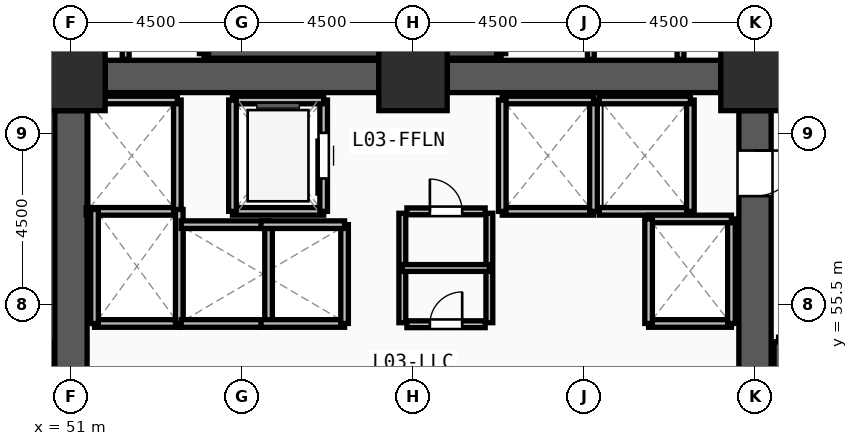
"""IFC4 building model, lengths in metres.
Left out: names, types, materials, properties, quantities, classifications, styles, units other than length and angle.
Written with IfcOpenShell. Run it as: python <this file> out.ifc"""

import sys

from ifc_helpers import new_model, si_unit, direction, frame, frame_2d, origin, origin_2d, place, context, subcontext, project, spatial, rectangle, extrude, source, transform, mapped, element, fill, save


model = new_model("IFC4")
c1 = context("Model", 3, precision=1e-05, world=origin(), true_north=direction((0.0, 1.0)))
c2 = subcontext(c1, "Body", "Model", "MODEL_VIEW")
j1 = project(units=[si_unit("LENGTHUNIT", "METRE"), si_unit("PLANEANGLEUNIT", "RADIAN")], contexts=[c1])
p1 = place(None, origin())
s1 = spatial("IfcSite", under=j1, at=p1, CompositionType="ELEMENT")
p2 = place(p1, origin())
s2 = spatial("IfcBuilding", under=s1, at=p2, CompositionType="ELEMENT")
p3 = place(p2, frame((0.0, 0.0, 9.9)))
s3 = spatial("IfcBuildingStorey", under=s2, at=p3, CompositionType="ELEMENT", Elevation=9.9)
m1 = source(origin(), c2, "Body", "SweptSolid", [
    extrude(rectangle(XDim=1.8, YDim=1.8, at=origin_2d()), origin(), (0.0, 0.0, 1.0), 4.5),
])
for number, where, z_axis, x_axis in (
    (1, (69.0, 61.5, 0.0), (0.0, 0.0, 1.0), (1.0, 0.0, 0.0)),
    (2, (60.0, 61.5, 0.0), (0.0, 0.0, 1.0), (1.0, 0.0, 0.0)),
    (3, (51.0, 61.5, 0.0), (0.0, 0.0, 1.0), (1.0, 0.0, 0.0)),
):
    element("IfcColumn", number, at=place(p3, frame(where, z_axis=z_axis, x_axis=x_axis)), inside=s3, PredefinedType="COLUMN", context=c2, shape_type="MappedRepresentation", body=[
        mapped(m1, transform((0.0, 0.0, 0.0), x_axis=(1.0, 0.0, 0.0), y_axis=(0.0, 1.0, 0.0), z_axis=(0.0, 0.0, 1.0), scale=1.0)),
    ])
for number, where, z_axis, x_axis in (
    (4, (51.9, 61.5, 0.0), (0.0, 0.0, 1.0), (1.0, 0.0, 0.0)),
    (5, (60.9, 61.5, 0.0), (0.0, 0.0, 1.0), (1.0, 0.0, 0.0)),
):
    element("IfcWall", number, at=place(p3, frame(where, z_axis=z_axis, x_axis=x_axis)), inside=s3, PredefinedType="SHEAR", context=c2, shape_type="SweptSolid", body=[
        extrude(rectangle(XDim=7.2, YDim=0.85, at=frame_2d((3.6, 0.0))), origin(), (0.0, 0.0, 1.0), 4.25),
    ])
p4 = place(p3, frame((69.0, 60.6, 0.0), z_axis=(0.0, 0.0, 1.0), x_axis=(0.0, -1.0, 0.0)))
e6 = element("IfcWall", 6, at=p4, inside=s3, PredefinedType="SHEAR", context=c2, shape_type="SweptSolid", body=[
    extrude(rectangle(XDim=13.2, YDim=0.85, at=frame_2d((6.6, 0.0))), origin(), (0.0, 0.0, 1.0), 4.25),
])
m2 = source(origin(), c2, "Body", "SweptSolid", [
    extrude(rectangle(XDim=1.2, YDim=2.2, at=frame_2d((0.6, 1.1))), frame((0.0, 0.435, 0.0), z_axis=(0.0, -1.0, 0.0), x_axis=(1.0, 0.0, 0.0)), (0.0, 0.0, 1.0), 0.87),
])
p5 = place(p4, frame((1.05, 0.0, 0.0)))
e7 = element("IfcOpeningElement", 7, at=p5, cuts=e6, PredefinedType="OPENING", context=c2, shape_type="MappedRepresentation", body=[
    mapped(m2, transform((0.0, 0.0, 0.0), x_axis=(1.0, 0.0, 0.0), y_axis=(0.0, 1.0, 0.0), z_axis=(0.0, 0.0, 1.0), scale=1.0)),
])
p6 = place(p3, frame((51.0, 47.4, 0.0), z_axis=(0.0, 0.0, 1.0), x_axis=(0.0, 1.0, 0.0)))
e8 = element("IfcWall", 8, at=p6, inside=s3, PredefinedType="SHEAR", context=c2, shape_type="SweptSolid", body=[
    extrude(rectangle(XDim=13.2, YDim=0.85, at=frame_2d((6.6, 0.0))), origin(), (0.0, 0.0, 1.0), 4.25),
])
for number, where, z_axis, x_axis in (
    (9, (69.62, 54.52, 0.0), (0.0, 0.0, 1.0), (0.0, -1.0, 0.0)),
    (10, (54.5, 62.1, 0.0), (0.0, 0.0, 1.0), (1.0, 0.0, 0.0)),
):
    element("IfcWall", number, at=place(p3, frame(where, z_axis=z_axis, x_axis=x_axis)), inside=s3, PredefinedType="SOLIDWALL", context=c2, shape_type="SweptSolid", body=[
        extrude(rectangle(XDim=7.82, YDim=0.24, at=frame_2d((3.91, 0.0))), origin(), (0.0, 0.0, 1.0), 4.25),
    ])
for number, where, z_axis, x_axis in (
    (11, (62.32, 62.1, 0.0), (0.0, 0.0, 1.0), (0.0, 1.0, 0.0)),
    (12, (54.5, 65.54, 0.0), (0.0, 0.0, 1.0), (0.0, -1.0, 0.0)),
):
    element("IfcWall", number, at=place(p3, frame(where, z_axis=z_axis, x_axis=x_axis)), inside=s3, PredefinedType="SOLIDWALL", context=c2, shape_type="SweptSolid", body=[
        extrude(rectangle(XDim=3.44, YDim=0.24, at=frame_2d((1.72, 0.0))), origin(), (0.0, 0.0, 1.0), 4.25),
    ])
p7 = place(p3, frame((55.25, 57.95, 0.0), z_axis=(0.0, 0.0, 1.0), x_axis=(1.0, 0.0, 0.0)))
e13 = element("IfcWall", 13, at=p7, inside=s3, PredefinedType="SOLIDWALL", context=c2, shape_type="SweptSolid", body=[
    extrude(rectangle(XDim=2.4, YDim=0.2, at=frame_2d((1.2, 0.0))), origin(), (0.0, 0.0, 1.0), 4.25),
])
p8 = place(p3, frame((57.65, 57.95, 0.0), z_axis=(0.0, 0.0, 1.0), x_axis=(0.0, 1.0, 0.0)))
e14 = element("IfcWall", 14, at=p8, inside=s3, PredefinedType="SOLIDWALL", context=c2, shape_type="SweptSolid", body=[
    extrude(rectangle(XDim=2.93, YDim=0.2, at=frame_2d((1.465, 0.0))), origin(), (0.0, 0.0, 1.0), 4.25),
])
m3 = source(origin(), c2, "Body", "SweptSolid", [
    extrude(rectangle(XDim=1.2, YDim=2.3, at=frame_2d((0.6, 1.15))), frame((0.0, 0.11, 0.0), z_axis=(0.0, -1.0, 0.0), x_axis=(1.0, 0.0, 0.0)), (0.0, 0.0, 1.0), 0.22),
])
p9 = place(p8, frame((0.865, 0.0, 0.0)))
e15 = element("IfcOpeningElement", 15, at=p9, cuts=e14, PredefinedType="OPENING", context=c2, shape_type="MappedRepresentation", body=[
    mapped(m3, transform((0.0, 0.0, 0.0), x_axis=(1.0, 0.0, 0.0), y_axis=(0.0, 1.0, 0.0), z_axis=(0.0, 0.0, 1.0), scale=1.0)),
])
p10 = place(p3, frame((57.65, 60.88, 0.0), z_axis=(0.0, 0.0, 1.0), x_axis=(-1.0, 0.0, 0.0)))
e16 = element("IfcWall", 16, at=p10, inside=s3, PredefinedType="SOLIDWALL", context=c2, shape_type="SweptSolid", body=[
    extrude(rectangle(XDim=2.4, YDim=0.2, at=frame_2d((1.2, 0.0))), origin(), (0.0, 0.0, 1.0), 4.25),
])
p11 = place(p3, frame((55.25, 60.88, 0.0), z_axis=(0.0, 0.0, 1.0), x_axis=(0.0, -1.0, 0.0)))
e17 = element("IfcWall", 17, at=p11, inside=s3, PredefinedType="SOLIDWALL", context=c2, shape_type="SweptSolid", body=[
    extrude(rectangle(XDim=2.93, YDim=0.2, at=frame_2d((1.465, 0.0))), origin(), (0.0, 0.0, 1.0), 4.25),
])
p12 = place(p3, frame((62.35, 57.95, 0.0), z_axis=(0.0, 0.0, 1.0), x_axis=(1.0, 0.0, 0.0)))
e18 = element("IfcWall", 18, at=p12, inside=s3, PredefinedType="SOLIDWALL", context=c2, shape_type="SweptSolid", body=[
    extrude(rectangle(XDim=2.4, YDim=0.2, at=frame_2d((1.2, 0.0))), origin(), (0.0, 0.0, 1.0), 4.25),
])
p13 = place(p3, frame((64.75, 57.95, 0.0), z_axis=(0.0, 0.0, 1.0), x_axis=(0.0, 1.0, 0.0)))
e19 = element("IfcWall", 19, at=p13, inside=s3, PredefinedType="SOLIDWALL", context=c2, shape_type="SweptSolid", body=[
    extrude(rectangle(XDim=2.93, YDim=0.2, at=frame_2d((1.465, 0.0))), origin(), (0.0, 0.0, 1.0), 4.25),
])
p14 = place(p3, frame((64.75, 60.88, 0.0), z_axis=(0.0, 0.0, 1.0), x_axis=(-1.0, 0.0, 0.0)))
e20 = element("IfcWall", 20, at=p14, inside=s3, PredefinedType="SOLIDWALL", context=c2, shape_type="SweptSolid", body=[
    extrude(rectangle(XDim=2.4, YDim=0.2, at=frame_2d((1.2, 0.0))), origin(), (0.0, 0.0, 1.0), 4.25),
])
p15 = place(p3, frame((62.35, 60.88, 0.0), z_axis=(0.0, 0.0, 1.0), x_axis=(0.0, -1.0, 0.0)))
e21 = element("IfcWall", 21, at=p15, inside=s3, PredefinedType="SOLIDWALL", context=c2, shape_type="SweptSolid", body=[
    extrude(rectangle(XDim=2.93, YDim=0.2, at=frame_2d((1.465, 0.0))), origin(), (0.0, 0.0, 1.0), 4.25),
])
p16 = place(p3, frame((64.9, 57.95, 0.0), z_axis=(0.0, 0.0, 1.0), x_axis=(1.0, 0.0, 0.0)))
e22 = element("IfcWall", 22, at=p16, inside=s3, PredefinedType="SOLIDWALL", context=c2, shape_type="SweptSolid", body=[
    extrude(rectangle(XDim=2.4, YDim=0.2, at=frame_2d((1.2, 0.0))), origin(), (0.0, 0.0, 1.0), 4.25),
])
p17 = place(p3, frame((67.3, 57.95, 0.0), z_axis=(0.0, 0.0, 1.0), x_axis=(0.0, 1.0, 0.0)))
e23 = element("IfcWall", 23, at=p17, inside=s3, PredefinedType="SOLIDWALL", context=c2, shape_type="SweptSolid", body=[
    extrude(rectangle(XDim=2.93, YDim=0.2, at=frame_2d((1.465, 0.0))), origin(), (0.0, 0.0, 1.0), 4.25),
])
for number, where, z_axis, x_axis in (
    (24, (67.3, 60.88, 0.0), (0.0, 0.0, 1.0), (-1.0, 0.0, 0.0)),
    (25, (51.4, 57.95, 0.0), (0.0, 0.0, 1.0), (1.0, 0.0, 0.0)),
):
    element("IfcWall", number, at=place(p3, frame(where, z_axis=z_axis, x_axis=x_axis)), inside=s3, PredefinedType="SOLIDWALL", context=c2, shape_type="SweptSolid", body=[
        extrude(rectangle(XDim=2.4, YDim=0.2, at=frame_2d((1.2, 0.0))), origin(), (0.0, 0.0, 1.0), 4.25),
    ])
p18 = place(p3, frame((53.8, 57.95, 0.0), z_axis=(0.0, 0.0, 1.0), x_axis=(0.0, 1.0, 0.0)))
e26 = element("IfcWall", 26, at=p18, inside=s3, PredefinedType="SOLIDWALL", context=c2, shape_type="SweptSolid", body=[
    extrude(rectangle(XDim=2.93, YDim=0.2, at=frame_2d((1.465, 0.0))), origin(), (0.0, 0.0, 1.0), 4.25),
])
p19 = place(p3, frame((53.8, 60.88, 0.0), z_axis=(0.0, 0.0, 1.0), x_axis=(-1.0, 0.0, 0.0)))
e27 = element("IfcWall", 27, at=p19, inside=s3, PredefinedType="SOLIDWALL", context=c2, shape_type="SweptSolid", body=[
    extrude(rectangle(XDim=2.4, YDim=0.2, at=frame_2d((1.2, 0.0))), origin(), (0.0, 0.0, 1.0), 4.25),
])
p20 = place(p3, frame((51.62, 55.0, 0.0), z_axis=(0.0, 0.0, 1.0), x_axis=(1.0, 0.0, 0.0)))
e28 = element("IfcWall", 28, at=p20, inside=s3, PredefinedType="SOLIDWALL", context=c2, shape_type="SweptSolid", body=[
    extrude(rectangle(XDim=2.23, YDim=0.2, at=frame_2d((1.115, 0.0))), origin(), (0.0, 0.0, 1.0), 4.25),
])
for number, where, z_axis, x_axis in (
    (29, (53.85, 55.0, 0.0), (0.0, 0.0, 1.0), (0.0, 1.0, 0.0)),
    (30, (51.62, 58.0, 0.0), (0.0, 0.0, 1.0), (0.0, -1.0, 0.0)),
):
    element("IfcWall", number, at=place(p3, frame(where, z_axis=z_axis, x_axis=x_axis)), inside=s3, PredefinedType="SOLIDWALL", context=c2, shape_type="SweptSolid", body=[
        extrude(rectangle(XDim=3.0, YDim=0.2, at=frame_2d((1.5, 0.0))), origin(), (0.0, 0.0, 1.0), 4.25),
    ])
p21 = place(p3, frame((66.2, 55.0, 0.0), z_axis=(0.0, 0.0, 1.0), x_axis=(1.0, 0.0, 0.0)))
e31 = element("IfcWall", 31, at=p21, inside=s3, PredefinedType="SOLIDWALL", context=c2, shape_type="SweptSolid", body=[
    extrude(rectangle(XDim=2.18, YDim=0.2, at=frame_2d((1.09, 0.0))), origin(), (0.0, 0.0, 1.0), 4.25),
])
p22 = place(p3, frame((68.38, 55.0, 0.0), z_axis=(0.0, 0.0, 1.0), x_axis=(0.0, 1.0, 0.0)))
e32 = element("IfcWall", 32, at=p22, inside=s3, PredefinedType="SOLIDWALL", context=c2, shape_type="SweptSolid", body=[
    extrude(rectangle(XDim=2.75, YDim=0.2, at=frame_2d((1.375, 0.0))), origin(), (0.0, 0.0, 1.0), 4.25),
])
p23 = place(p3, frame((68.38, 57.75, 0.0), z_axis=(0.0, 0.0, 1.0), x_axis=(-1.0, 0.0, 0.0)))
e33 = element("IfcWall", 33, at=p23, inside=s3, PredefinedType="SOLIDWALL", context=c2, shape_type="SweptSolid", body=[
    extrude(rectangle(XDim=2.18, YDim=0.2, at=frame_2d((1.09, 0.0))), origin(), (0.0, 0.0, 1.0), 4.25),
])
p24 = place(p3, frame((66.2, 57.75, 0.0), z_axis=(0.0, 0.0, 1.0), x_axis=(0.0, -1.0, 0.0)))
e34 = element("IfcWall", 34, at=p24, inside=s3, PredefinedType="SOLIDWALL", context=c2, shape_type="SweptSolid", body=[
    extrude(rectangle(XDim=2.75, YDim=0.2, at=frame_2d((1.375, 0.0))), origin(), (0.0, 0.0, 1.0), 4.25),
])
p25 = place(p3, frame((53.9, 55.0, 0.0), z_axis=(0.0, 0.0, 1.0), x_axis=(1.0, 0.0, 0.0)))
e35 = element("IfcWall", 35, at=p25, inside=s3, PredefinedType="SOLIDWALL", context=c2, shape_type="SweptSolid", body=[
    extrude(rectangle(XDim=2.3, YDim=0.2, at=frame_2d((1.15, 0.0))), origin(), (0.0, 0.0, 1.0), 4.25),
])
p26 = place(p3, frame((56.2, 55.0, 0.0), z_axis=(0.0, 0.0, 1.0), x_axis=(0.0, 1.0, 0.0)))
e36 = element("IfcWall", 36, at=p26, inside=s3, PredefinedType="SOLIDWALL", context=c2, shape_type="SweptSolid", body=[
    extrude(rectangle(XDim=2.6, YDim=0.2, at=frame_2d((1.3, 0.0))), origin(), (0.0, 0.0, 1.0), 4.25),
])
p27 = place(p3, frame((56.2, 57.6, 0.0), z_axis=(0.0, 0.0, 1.0), x_axis=(-1.0, 0.0, 0.0)))
e37 = element("IfcWall", 37, at=p27, inside=s3, PredefinedType="SOLIDWALL", context=c2, shape_type="SweptSolid", body=[
    extrude(rectangle(XDim=2.3, YDim=0.2, at=frame_2d((1.15, 0.0))), origin(), (0.0, 0.0, 1.0), 4.25),
])
p28 = place(p3, frame((56.0, 55.0, 0.0), z_axis=(0.0, 0.0, 1.0), x_axis=(1.0, 0.0, 0.0)))
e38 = element("IfcWall", 38, at=p28, inside=s3, PredefinedType="SOLIDWALL", context=c2, shape_type="SweptSolid", body=[
    extrude(rectangle(XDim=2.2, YDim=0.2, at=frame_2d((1.1, 0.0))), origin(), (0.0, 0.0, 1.0), 4.25),
])
p29 = place(p3, frame((58.2, 55.0, 0.0), z_axis=(0.0, 0.0, 1.0), x_axis=(0.0, 1.0, 0.0)))
e39 = element("IfcWall", 39, at=p29, inside=s3, PredefinedType="SOLIDWALL", context=c2, shape_type="SweptSolid", body=[
    extrude(rectangle(XDim=2.6, YDim=0.2, at=frame_2d((1.3, 0.0))), origin(), (0.0, 0.0, 1.0), 4.25),
])
p30 = place(p3, frame((58.2, 57.6, 0.0), z_axis=(0.0, 0.0, 1.0), x_axis=(-1.0, 0.0, 0.0)))
e40 = element("IfcWall", 40, at=p30, inside=s3, PredefinedType="SOLIDWALL", context=c2, shape_type="SweptSolid", body=[
    extrude(rectangle(XDim=2.2, YDim=0.2, at=frame_2d((1.1, 0.0))), origin(), (0.0, 0.0, 1.0), 4.25),
])
p31 = place(p3, frame((59.84, 54.98, 0.0), z_axis=(0.0, 0.0, 1.0), x_axis=(1.0, 0.0, 0.0)))
e41 = element("IfcWall", 41, at=p31, inside=s3, PredefinedType="PARTITIONING", context=c2, shape_type="SweptSolid", body=[
    extrude(rectangle(XDim=2.06, YDim=0.18, at=frame_2d((1.03, 0.0))), origin(), (0.0, 0.0, 1.0), 4.25),
])
m4 = source(origin(), c2, "Body", "SweptSolid", [
    extrude(rectangle(XDim=0.85, YDim=2.1, at=frame_2d((0.425, 1.05))), frame((0.0, 0.1, 0.0), z_axis=(0.0, -1.0, 0.0), x_axis=(1.0, 0.0, 0.0)), (0.0, 0.0, 1.0), 0.2),
])
p32 = place(p31, frame((0.605, 0.0, 0.0)))
e42 = element("IfcOpeningElement", 42, at=p32, cuts=e41, PredefinedType="OPENING", context=c2, shape_type="MappedRepresentation", body=[
    mapped(m4, transform((0.0, 0.0, 0.0), x_axis=(1.0, 0.0, 0.0), y_axis=(0.0, 1.0, 0.0), z_axis=(0.0, 0.0, 1.0), scale=1.0)),
])
p33 = place(p3, frame((59.84, 57.95, 0.0), z_axis=(0.0, 0.0, 1.0), x_axis=(1.0, 0.0, 0.0)))
e43 = element("IfcWall", 43, at=p33, inside=s3, PredefinedType="PARTITIONING", context=c2, shape_type="SweptSolid", body=[
    extrude(rectangle(XDim=2.06, YDim=0.18, at=frame_2d((1.03, 0.0))), origin(), (0.0, 0.0, 1.0), 4.25),
])
p34 = place(p33, frame((0.605, 0.0, 0.0)))
e44 = element("IfcOpeningElement", 44, at=p34, cuts=e43, PredefinedType="OPENING", context=c2, shape_type="MappedRepresentation", body=[
    mapped(m4, transform((0.0, 0.0, 0.0), x_axis=(1.0, 0.0, 0.0), y_axis=(0.0, 1.0, 0.0), z_axis=(0.0, 0.0, 1.0), scale=1.0)),
])
for number, where, z_axis, x_axis in (
    (45, (59.72, 55.02, 0.0), (0.0, 0.0, 1.0), (0.0, 1.0, 0.0)),
    (46, (62.01, 55.02, 0.0), (0.0, 0.0, 1.0), (0.0, 1.0, 0.0)),
):
    element("IfcWall", number, at=place(p3, frame(where, z_axis=z_axis, x_axis=x_axis)), inside=s3, PredefinedType="PARTITIONING", context=c2, shape_type="SweptSolid", body=[
        extrude(rectangle(XDim=2.88, YDim=0.18, at=frame_2d((1.44, 0.0))), origin(), (0.0, 0.0, 1.0), 4.25),
    ])
p35 = place(p3, frame((59.72, 56.46, 0.0), z_axis=(0.0, 0.0, 1.0), x_axis=(1.0, 0.0, 0.0)))
e47 = element("IfcWall", 47, at=p35, inside=s3, PredefinedType="PARTITIONING", context=c2, shape_type="SweptSolid", body=[
    extrude(rectangle(XDim=2.29, YDim=0.18, at=frame_2d((1.145, 0.0))), origin(), (0.0, 0.0, 1.0), 4.25),
])
for number, where, z_axis, x_axis in (
    (48, (50.54, 61.95, 0.0), (0.0, 0.0, 1.0), (0.0, 1.0, 0.0)),
    (49, (52.44, 61.95, 0.0), (0.0, 0.0, 1.0), (0.0, 1.0, 0.0)),
    (50, (64.68, 61.95, 0.0), (0.0, 0.0, 1.0), (0.0, 1.0, 0.0)),
    (51, (67.04, 61.95, 0.0), (0.0, 0.0, 1.0), (0.0, 1.0, 0.0)),
    (52, (69.46, 61.95, 0.0), (0.0, 0.0, 1.0), (0.0, 1.0, 0.0)),
):
    element("IfcWall", number, at=place(p3, frame(where, z_axis=z_axis, x_axis=x_axis)), inside=s3, PredefinedType="PARTITIONING", context=c2, shape_type="SweptSolid", body=[
        extrude(rectangle(XDim=3.77, YDim=0.18, at=frame_2d((1.885, 0.0))), origin(), (0.0, 0.0, 1.0), 4.25),
    ])
m5 = source(origin(), c2, "Body", "SweptSolid", [
    extrude(rectangle(XDim=1.2, YDim=2.2, at=frame_2d((0.6, 1.1))), frame((0.0, 0.025, 0.0), z_axis=(0.0, -1.0, 0.0), x_axis=(1.0, 0.0, 0.0)), (0.0, 0.0, 1.0), 0.05),
])
p36 = place(p5, origin())
e53 = element("IfcDoor", 53, at=p36, inside=s3, OperationType="SINGLE_SWING_LEFT", PredefinedType="DOOR", context=c2, shape_type="MappedRepresentation", body=[
    mapped(m5, transform((0.0, 0.0, 0.0), x_axis=(1.0, 0.0, 0.0), y_axis=(0.0, 1.0, 0.0), z_axis=(0.0, 0.0, 1.0), scale=1.0)),
])
fill(e7, e53)
m6 = source(origin(), c2, "Body", "SweptSolid", [
    extrude(rectangle(XDim=1.2, YDim=2.3, at=frame_2d((0.6, 1.15))), frame((0.0, 0.025, 0.0), z_axis=(0.0, -1.0, 0.0), x_axis=(1.0, 0.0, 0.0)), (0.0, 0.0, 1.0), 0.05),
])
p37 = place(p9, origin())
e54 = element("IfcDoor", 54, at=p37, inside=s3, OperationType="SLIDING_TO_LEFT", PredefinedType="DOOR", context=c2, shape_type="MappedRepresentation", body=[
    mapped(m6, transform((0.0, 0.0, 0.0), x_axis=(1.0, 0.0, 0.0), y_axis=(0.0, 1.0, 0.0), z_axis=(0.0, 0.0, 1.0), scale=1.0)),
])
fill(e15, e54)
m7 = source(origin(), c2, "Body", "SweptSolid", [
    extrude(rectangle(XDim=0.85, YDim=2.1, at=frame_2d((0.425, 1.05))), frame((0.0, 0.025, 0.0), z_axis=(0.0, -1.0, 0.0), x_axis=(1.0, 0.0, 0.0)), (0.0, 0.0, 1.0), 0.05),
])
p38 = place(p32, origin())
e55 = element("IfcDoor", 55, at=p38, inside=s3, OperationType="SINGLE_SWING_RIGHT", PredefinedType="DOOR", context=c2, shape_type="MappedRepresentation", body=[
    mapped(m7, transform((0.0, 0.0, 0.0), x_axis=(1.0, 0.0, 0.0), y_axis=(0.0, 1.0, 0.0), z_axis=(0.0, 0.0, 1.0), scale=1.0)),
])
fill(e42, e55)
p39 = place(p34, origin())
e56 = element("IfcDoor", 56, at=p39, inside=s3, OperationType="SINGLE_SWING_LEFT", PredefinedType="DOOR", context=c2, shape_type="MappedRepresentation", body=[
    mapped(m7, transform((0.0, 0.0, 0.0), x_axis=(1.0, 0.0, 0.0), y_axis=(0.0, 1.0, 0.0), z_axis=(0.0, 0.0, 1.0), scale=1.0)),
])
fill(e44, e56)
save(model, sys.argv[1])
